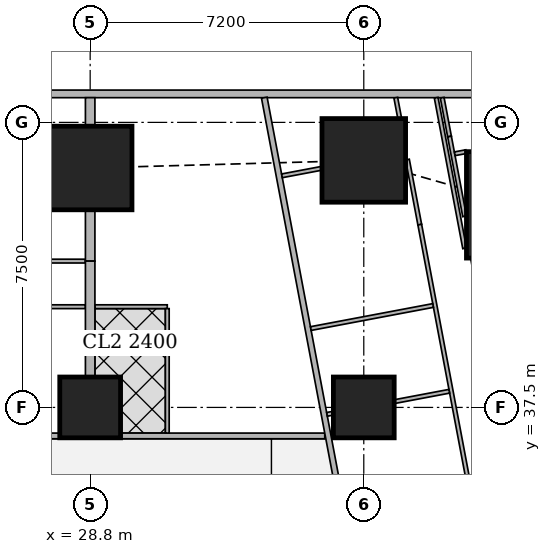
"""IFC4 building model, lengths in metres.
Left out: names, types, materials, properties, quantities, classifications, styles, units other than length and angle.
Written with IfcOpenShell. Run it as: python <this file> out.ifc"""

import sys

from ifc_helpers import new_model, si_unit, direction, frame, frame_2d, origin, origin_2d, place, context, subcontext, project, spatial, rectangle, extrude, element, fill, save


model = new_model("IFC4")
c1 = context("Model", 3, precision=1e-05, world=origin(), true_north=direction((0.0, 1.0)))
c2 = subcontext(c1, "Body", "Model", "MODEL_VIEW")
j1 = project(units=[si_unit("LENGTHUNIT", "METRE"), si_unit("PLANEANGLEUNIT", "RADIAN")], contexts=[c1])
p1 = place(None, origin())
s1 = spatial("IfcSite", under=j1, at=p1, CompositionType="ELEMENT")
p2 = place(p1, origin())
s2 = spatial("IfcBuilding", under=s1, at=p2, CompositionType="ELEMENT")
p3 = place(p2, frame((0.0, 0.0, 81.65)))
s3 = spatial("IfcBuildingStorey", under=s2, at=p3, CompositionType="ELEMENT", Elevation=81.65)
for number, where, z_axis, x_axis in (
    (1, (28.8, 37.5, 0.0), (0.0, 0.0, 1.0), (1.0, 0.0, 0.0)),
    (2, (36.0, 37.5, 0.0), (0.0, 0.0, 1.0), (1.0, 0.0, 0.0)),
):
    element("IfcColumn", number, at=place(p3, frame(where, z_axis=z_axis, x_axis=x_axis)), inside=s3, PredefinedType="COLUMN", context=c2, shape_type="SweptSolid", body=[
        extrude(rectangle(XDim=1.6, YDim=1.6, at=origin_2d()), origin(), (0.0, 0.0, 1.0), 3.75),
    ])
p4 = place(p3, frame((40.102, 42.83, 0.0), z_axis=(0.0, 0.0, 1.0), x_axis=(1.0, 0.0, 0.0)))
e3 = element("IfcColumn", 3, at=p4, inside=s3, PredefinedType="COLUMN", context=c2, shape_type="SweptSolid", body=[
    extrude(rectangle(XDim=2.8, YDim=2.8, at=origin_2d()), origin(), (0.0, 0.0, 1.0), 3.75),
])
for number, where, z_axis, x_axis in (
    (4, (28.8, 43.8, 0.0), (0.0, 0.0, 1.0), (1.0, 0.0, 0.0)),
    (5, (36.0, 44.0, 0.0), (0.0, 0.0, 1.0), (1.0, 0.0, 0.0)),
):
    element("IfcColumn", number, at=place(p3, frame(where, z_axis=z_axis, x_axis=x_axis)), inside=s3, PredefinedType="COLUMN", context=c2, shape_type="SweptSolid", body=[
        extrude(rectangle(XDim=2.2, YDim=2.2, at=origin_2d()), origin(), (0.0, 0.0, 1.0), 3.75),
    ])
p5 = place(p3, frame((40.106, 45.75, 0.0), z_axis=(0.0, 0.0, 1.0), x_axis=(-1.0, 0.0, 0.0)))
e6 = element("IfcWall", 6, at=p5, inside=s3, PredefinedType="SOLIDWALL", context=c2, shape_type="SweptSolid", body=[
    extrude(rectangle(XDim=37.943, YDim=0.2, at=frame_2d((18.971, 0.0))), origin(), (0.0, 0.0, 1.0), 3.5),
])
p6 = place(p5, frame((8.606, 0.0, 0.9)))
e7 = element("IfcOpeningElement", 7, at=p6, cuts=e6, PredefinedType="OPENING", context=c2, shape_type="SweptSolid", body=[
    extrude(rectangle(XDim=1.8, YDim=1.5, at=frame_2d((0.9, 0.75))), frame((0.0, 0.11, 0.0), z_axis=(0.0, -1.0, 0.0), x_axis=(1.0, 0.0, 0.0)), (0.0, 0.0, 1.0), 0.22),
])
p7 = place(p5, frame((12.206, 0.0, 0.9)))
e8 = element("IfcOpeningElement", 8, at=p7, cuts=e6, PredefinedType="OPENING", context=c2, shape_type="SweptSolid", body=[
    extrude(rectangle(XDim=1.8, YDim=1.5, at=frame_2d((0.9, 0.75))), frame((0.0, 0.11, 0.0), z_axis=(0.0, -1.0, 0.0), x_axis=(1.0, 0.0, 0.0)), (0.0, 0.0, 1.0), 0.22),
])
p8 = place(p5, frame((15.806, 0.0, 0.9)))
e9 = element("IfcOpeningElement", 9, at=p8, cuts=e6, PredefinedType="OPENING", context=c2, shape_type="SweptSolid", body=[
    extrude(rectangle(XDim=1.8, YDim=1.5, at=frame_2d((0.9, 0.75))), frame((0.0, 0.11, 0.0), z_axis=(0.0, -1.0, 0.0), x_axis=(1.0, 0.0, 0.0)), (0.0, 0.0, 1.0), 0.22),
])
p9 = place(p5, frame((19.406, 0.0, 0.9)))
e10 = element("IfcOpeningElement", 10, at=p9, cuts=e6, PredefinedType="OPENING", context=c2, shape_type="SweptSolid", body=[
    extrude(rectangle(XDim=1.8, YDim=1.5, at=frame_2d((0.9, 0.75))), frame((0.0, 0.11, 0.0), z_axis=(0.0, -1.0, 0.0), x_axis=(1.0, 0.0, 0.0)), (0.0, 0.0, 1.0), 0.22),
])
p10 = place(p5, frame((23.006, 0.0, 0.9)))
e11 = element("IfcOpeningElement", 11, at=p10, cuts=e6, PredefinedType="OPENING", context=c2, shape_type="SweptSolid", body=[
    extrude(rectangle(XDim=1.8, YDim=1.5, at=frame_2d((0.9, 0.75))), frame((0.0, 0.11, 0.0), z_axis=(0.0, -1.0, 0.0), x_axis=(1.0, 0.0, 0.0)), (0.0, 0.0, 1.0), 0.22),
])
p11 = place(p5, frame((26.606, 0.0, 0.9)))
e12 = element("IfcOpeningElement", 12, at=p11, cuts=e6, PredefinedType="OPENING", context=c2, shape_type="SweptSolid", body=[
    extrude(rectangle(XDim=1.8, YDim=1.5, at=frame_2d((0.9, 0.75))), frame((0.0, 0.11, 0.0), z_axis=(0.0, -1.0, 0.0), x_axis=(1.0, 0.0, 0.0)), (0.0, 0.0, 1.0), 0.22),
])
p12 = place(p3, frame((22.401, 36.75, 0.0), z_axis=(0.0, 0.0, 1.0), x_axis=(1.0, 0.0, 0.0)))
e13 = element("IfcWall", 13, at=p12, inside=s3, PredefinedType="SOLIDWALL", context=c2, shape_type="SweptSolid", body=[
    extrude(rectangle(XDim=5.598, YDim=0.15, at=frame_2d((2.799, 0.0))), origin(), (0.0, 0.0, 1.0), 3.5),
])
p13 = place(p3, frame((29.601, 36.75, 0.0), z_axis=(0.0, 0.0, 1.0), x_axis=(1.0, 0.0, 0.0)))
e14 = element("IfcWall", 14, at=p13, inside=s3, PredefinedType="SOLIDWALL", context=c2, shape_type="SweptSolid", body=[
    extrude(rectangle(XDim=5.372, YDim=0.15, at=frame_2d((2.686, 0.0))), origin(), (0.0, 0.0, 1.0), 3.5),
])
p14 = place(p13, frame((2.845, 0.0, 0.0)))
e15 = element("IfcOpeningElement", 15, at=p14, cuts=e14, PredefinedType="OPENING", context=c2, shape_type="SweptSolid", body=[
    extrude(rectangle(XDim=1.0, YDim=2.1, at=frame_2d((0.5, 1.05))), frame((0.0, 0.085, 0.0), z_axis=(0.0, -1.0, 0.0), x_axis=(1.0, 0.0, 0.0)), (0.0, 0.0, 1.0), 0.17),
])
p15 = place(p3, frame((33.382, 45.65, 0.0), z_axis=(0.0, 0.0, 1.0), x_axis=(0.185593544777, -0.982626600565, 0.0)))
e16 = element("IfcWall", 16, at=p15, inside=s3, PredefinedType="SOLIDWALL", context=c2, shape_type="SweptSolid", body=[
    extrude(rectangle(XDim=47.118, YDim=0.15, at=frame_2d((23.559, 0.0))), origin(), (0.0, 0.0, 1.0), 2.2),
])
p16 = place(p15, frame((19.054, 0.0, 0.0)))
e17 = element("IfcOpeningElement", 17, at=p16, cuts=e16, PredefinedType="OPENING", context=c2, shape_type="SweptSolid", body=[
    extrude(rectangle(XDim=1.0, YDim=2.1, at=frame_2d((0.5, 1.05))), frame((0.0, 0.085, 0.0), z_axis=(0.0, -1.0, 0.0), x_axis=(1.0, 0.0, 0.0)), (0.0, 0.0, 1.0), 0.17),
])
p17 = place(p15, frame((22.87, 0.0, 0.0)))
e18 = element("IfcOpeningElement", 18, at=p17, cuts=e16, PredefinedType="OPENING", context=c2, shape_type="SweptSolid", body=[
    extrude(rectangle(XDim=1.0, YDim=2.1, at=frame_2d((0.5, 1.05))), frame((0.0, 0.085, 0.0), z_axis=(0.0, -1.0, 0.0), x_axis=(1.0, 0.0, 0.0)), (0.0, 0.0, 1.0), 0.17),
])
p18 = place(p15, frame((33.833, 0.0, 0.0)))
e19 = element("IfcOpeningElement", 19, at=p18, cuts=e16, PredefinedType="OPENING", context=c2, shape_type="SweptSolid", body=[
    extrude(rectangle(XDim=1.0, YDim=2.1, at=frame_2d((0.5, 1.05))), frame((0.0, 0.085, 0.0), z_axis=(0.0, -1.0, 0.0), x_axis=(1.0, 0.0, 0.0)), (0.0, 0.0, 1.0), 0.17),
])
p19 = place(p3, frame((38.654, 41.686, 0.0), z_axis=(0.0, 0.0, 1.0), x_axis=(-0.185676896978, 0.982610853761, 0.0)))
e20 = element("IfcWall", 20, at=p19, inside=s3, PredefinedType="PARTITIONING", context=c2, shape_type="SweptSolid", body=[
    extrude(rectangle(XDim=4.034, YDim=0.1, at=frame_2d((2.017, 0.0))), origin(), (0.0, 0.0, 1.0), 2.05),
])
p20 = place(p3, frame((38.063, 45.65, 0.0), z_axis=(0.0, 0.0, 1.0), x_axis=(0.185677287841, -0.982610779902, 0.0)))
e21 = element("IfcWall", 21, at=p20, inside=s3, PredefinedType="PARTITIONING", context=c2, shape_type="SweptSolid", body=[
    extrude(rectangle(XDim=1.04, YDim=0.1, at=frame_2d((0.52, 0.0))), origin(), (0.0, 0.0, 1.0), 3.5),
])
p21 = place(p3, frame((38.256, 44.628, 0.0), z_axis=(0.0, 0.0, 1.0), x_axis=(0.185757524649, -0.982595614704, 0.0)))
e22 = element("IfcWall", 22, at=p21, inside=s3, PredefinedType="PARTITIONING", context=c2, shape_type="SweptSolid", body=[
    extrude(rectangle(XDim=2.137, YDim=0.1, at=frame_2d((1.068, 0.0))), origin(), (0.0, 0.0, 1.0), 2.05),
])
p22 = place(p3, frame((38.862, 41.42, 0.0), z_axis=(0.0, 0.0, 1.0), x_axis=(0.185529020159, -0.982638785454, 0.0)))
e23 = element("IfcWall", 23, at=p22, inside=s3, PredefinedType="PARTITIONING", context=c2, shape_type="SweptSolid", body=[
    extrude(rectangle(XDim=12.262, YDim=0.1, at=frame_2d((6.131, 0.0))), origin(), (0.0, 0.0, 1.0), 2.5),
])
p23 = place(p22, frame((11.212, 0.0, 0.0)))
e24 = element("IfcOpeningElement", 24, at=p23, cuts=e23, PredefinedType="OPENING", context=c2, shape_type="SweptSolid", body=[
    extrude(rectangle(XDim=0.9, YDim=2.1, at=frame_2d((0.45, 1.05))), frame((0.0, 0.06, 0.0), z_axis=(0.0, -1.0, 0.0), x_axis=(1.0, 0.0, 0.0)), (0.0, 0.0, 1.0), 0.12),
])
p24 = place(p22, frame((7.555, 0.0, 0.0)))
e25 = element("IfcOpeningElement", 25, at=p24, cuts=e23, PredefinedType="OPENING", context=c2, shape_type="SweptSolid", body=[
    extrude(rectangle(XDim=0.9, YDim=2.1, at=frame_2d((0.45, 1.05))), frame((0.0, 0.06, 0.0), z_axis=(0.0, -1.0, 0.0), x_axis=(1.0, 0.0, 0.0)), (0.0, 0.0, 1.0), 0.12),
])
p25 = place(p22, frame((3.579, 0.0, 0.0)))
e26 = element("IfcOpeningElement", 26, at=p25, cuts=e23, PredefinedType="OPENING", context=c2, shape_type="SweptSolid", body=[
    extrude(rectangle(XDim=0.9, YDim=2.1, at=frame_2d((0.45, 1.05))), frame((0.0, 0.06, 0.0), z_axis=(0.0, -1.0, 0.0), x_axis=(1.0, 0.0, 0.0)), (0.0, 0.0, 1.0), 0.12),
])
p26 = place(p3, frame((36.842, 45.65, 0.0), z_axis=(0.0, 0.0, 1.0), x_axis=(0.185764109712, -0.98259436979, 0.0)))
e27 = element("IfcWall", 27, at=p26, inside=s3, PredefinedType="PARTITIONING", context=c2, shape_type="SweptSolid", body=[
    extrude(rectangle(XDim=0.549, YDim=0.1, at=frame_2d((0.275, 0.0))), origin(), (0.0, 0.0, 1.0), 3.5),
])
p27 = place(p3, frame((37.149, 44.022, 0.0), z_axis=(0.0, 0.0, 1.0), x_axis=(0.185844162065, -0.982579232137, 0.0)))
e28 = element("IfcWall", 28, at=p27, inside=s3, PredefinedType="PARTITIONING", context=c2, shape_type="SweptSolid", body=[
    extrude(rectangle(XDim=1.743, YDim=0.1, at=frame_2d((0.872, 0.0))), origin(), (0.0, 0.0, 1.0), 2.05),
])
p28 = place(p3, frame((37.473, 42.309, 0.0), z_axis=(0.0, 0.0, 1.0), x_axis=(0.185570636839, -0.982630927024, 0.0)))
e29 = element("IfcWall", 29, at=p28, inside=s3, PredefinedType="PARTITIONING", context=c2, shape_type="SweptSolid", body=[
    extrude(rectangle(XDim=13.553, YDim=0.1, at=frame_2d((6.777, 0.0))), origin(), (0.0, 0.0, 1.0), 2.5),
])
p29 = place(p28, frame((12.049, 0.0, 0.0)))
e30 = element("IfcOpeningElement", 30, at=p29, cuts=e29, PredefinedType="OPENING", context=c2, shape_type="SweptSolid", body=[
    extrude(rectangle(XDim=0.9, YDim=2.1, at=frame_2d((0.45, 1.05))), frame((0.0, 0.06, 0.0), z_axis=(0.0, -1.0, 0.0), x_axis=(1.0, 0.0, 0.0)), (0.0, 0.0, 1.0), 0.12),
])
p30 = place(p28, frame((8.427, 0.0, 0.0)))
e31 = element("IfcOpeningElement", 31, at=p30, cuts=e29, PredefinedType="OPENING", context=c2, shape_type="SweptSolid", body=[
    extrude(rectangle(XDim=0.9, YDim=2.1, at=frame_2d((0.45, 1.05))), frame((0.0, 0.06, 0.0), z_axis=(0.0, -1.0, 0.0), x_axis=(1.0, 0.0, 0.0)), (0.0, 0.0, 1.0), 0.12),
])
p31 = place(p28, frame((2.853, 0.0, 0.0)))
e32 = element("IfcOpeningElement", 32, at=p31, cuts=e29, PredefinedType="OPENING", context=c2, shape_type="SweptSolid", body=[
    extrude(rectangle(XDim=0.9, YDim=2.1, at=frame_2d((0.45, 1.05))), frame((0.0, 0.06, 0.0), z_axis=(0.0, -1.0, 0.0), x_axis=(1.0, 0.0, 0.0)), (0.0, 0.0, 1.0), 0.12),
])
p32 = place(p28, frame((10.14, 0.0, 0.0)))
e33 = element("IfcOpeningElement", 33, at=p32, cuts=e29, PredefinedType="OPENING", context=c2, shape_type="SweptSolid", body=[
    extrude(rectangle(XDim=0.9, YDim=2.1, at=frame_2d((0.45, 1.05))), frame((0.0, 0.06, 0.0), z_axis=(0.0, -1.0, 0.0), x_axis=(1.0, 0.0, 0.0)), (0.0, 0.0, 1.0), 0.12),
])
p33 = place(p28, frame((5.759, 0.0, 0.0)))
e34 = element("IfcOpeningElement", 34, at=p33, cuts=e29, PredefinedType="OPENING", context=c2, shape_type="SweptSolid", body=[
    extrude(rectangle(XDim=0.9, YDim=2.1, at=frame_2d((0.45, 1.05))), frame((0.0, 0.06, 0.0), z_axis=(0.0, -1.0, 0.0), x_axis=(1.0, 0.0, 0.0)), (0.0, 0.0, 1.0), 0.12),
])
p34 = place(p3, frame((38.692, 44.23, 0.0), z_axis=(0.0, 0.0, 1.0), x_axis=(-0.982944840311, -0.183900627803, 0.0)))
e35 = element("IfcWall", 35, at=p34, inside=s3, PredefinedType="PARTITIONING", context=c2, shape_type="SweptSolid", body=[
    extrude(rectangle(XDim=0.304, YDim=0.1, at=frame_2d((0.152, 0.0))), origin(), (0.0, 0.0, 1.0), 2.05),
])
p35 = place(p3, frame((34.89, 43.791, 0.0), z_axis=(0.0, 0.0, 1.0), x_axis=(-0.982621304855, -0.185621580763, 0.0)))
e36 = element("IfcWall", 36, at=p35, inside=s3, PredefinedType="PARTITIONING", context=c2, shape_type="SweptSolid", body=[
    extrude(rectangle(XDim=1.062, YDim=0.1, at=frame_2d((0.531, 0.0))), origin(), (0.0, 0.0, 1.0), 2.05),
])
p36 = place(p3, frame((37.824, 40.182, 0.0), z_axis=(0.0, 0.0, 1.0), x_axis=(-0.982674977865, -0.185337227447, 0.0)))
e37 = element("IfcWall", 37, at=p36, inside=s3, PredefinedType="PARTITIONING", context=c2, shape_type="SweptSolid", body=[
    extrude(rectangle(XDim=3.275, YDim=0.1, at=frame_2d((1.637, 0.0))), origin(), (0.0, 0.0, 1.0), 3.5),
])
p37 = place(p3, frame((38.25, 37.925, 0.0), z_axis=(0.0, 0.0, 1.0), x_axis=(-0.982626127294, -0.185596050493, 0.0)))
e38 = element("IfcWall", 38, at=p37, inside=s3, PredefinedType="PARTITIONING", context=c2, shape_type="SweptSolid", body=[
    extrude(rectangle(XDim=1.465, YDim=0.1, at=frame_2d((0.733, 0.0))), origin(), (0.0, 0.0, 1.0), 3.5),
])
p38 = place(p3, frame((35.19, 37.347, 0.0), z_axis=(0.0, 0.0, 1.0), x_axis=(-0.982404955251, -0.186763229514, 0.0)))
e39 = element("IfcWall", 39, at=p38, inside=s3, PredefinedType="PARTITIONING", context=c2, shape_type="SweptSolid", body=[
    extrude(rectangle(XDim=0.161, YDim=0.1, at=frame_2d((0.081, 0.0))), origin(), (0.0, 0.0, 1.0), 3.5),
])
p39 = place(p3, frame((18.0, 41.35, 0.0), z_axis=(0.0, 0.0, 1.0), x_axis=(1.0, 0.0, 0.0)))
e40 = element("IfcWall", 40, at=p39, inside=s3, PredefinedType="PARTITIONING", context=c2, shape_type="SweptSolid", body=[
    extrude(rectangle(XDim=10.675, YDim=0.1, at=frame_2d((5.337, 0.0))), origin(), (0.0, 0.0, 1.0), 3.5),
])
p40 = place(p39, frame((0.2, 0.0, 0.0)))
e41 = element("IfcOpeningElement", 41, at=p40, cuts=e40, PredefinedType="OPENING", context=c2, shape_type="SweptSolid", body=[
    extrude(rectangle(XDim=0.9, YDim=2.1, at=frame_2d((0.45, 1.05))), frame((0.0, 0.06, 0.0), z_axis=(0.0, -1.0, 0.0), x_axis=(1.0, 0.0, 0.0)), (0.0, 0.0, 1.0), 0.12),
])
p41 = place(p39, frame((3.8, 0.0, 0.0)))
e42 = element("IfcOpeningElement", 42, at=p41, cuts=e40, PredefinedType="OPENING", context=c2, shape_type="SweptSolid", body=[
    extrude(rectangle(XDim=0.9, YDim=2.1, at=frame_2d((0.45, 1.05))), frame((0.0, 0.06, 0.0), z_axis=(0.0, -1.0, 0.0), x_axis=(1.0, 0.0, 0.0)), (0.0, 0.0, 1.0), 0.12),
])
p42 = place(p39, frame((7.4, 0.0, 0.0)))
e43 = element("IfcOpeningElement", 43, at=p42, cuts=e40, PredefinedType="OPENING", context=c2, shape_type="SweptSolid", body=[
    extrude(rectangle(XDim=0.9, YDim=2.1, at=frame_2d((0.45, 1.05))), frame((0.0, 0.06, 0.0), z_axis=(0.0, -1.0, 0.0), x_axis=(1.0, 0.0, 0.0)), (0.0, 0.0, 1.0), 0.12),
])
p43 = place(p3, frame((18.0, 40.15, 0.0), z_axis=(0.0, 0.0, 1.0), x_axis=(1.0, 0.0, 0.0)))
e44 = element("IfcWall", 44, at=p43, inside=s3, PredefinedType="PARTITIONING", context=c2, shape_type="SweptSolid", body=[
    extrude(rectangle(XDim=10.675, YDim=0.1, at=frame_2d((5.337, 0.0))), origin(), (0.0, 0.0, 1.0), 3.5),
])
p44 = place(p43, frame((0.655, 0.0, 0.0)))
e45 = element("IfcOpeningElement", 45, at=p44, cuts=e44, PredefinedType="OPENING", context=c2, shape_type="SweptSolid", body=[
    extrude(rectangle(XDim=0.9, YDim=2.1, at=frame_2d((0.45, 1.05))), frame((0.0, 0.06, 0.0), z_axis=(0.0, -1.0, 0.0), x_axis=(1.0, 0.0, 0.0)), (0.0, 0.0, 1.0), 0.12),
])
p45 = place(p43, frame((3.95, 0.0, 0.0)))
e46 = element("IfcOpeningElement", 46, at=p45, cuts=e44, PredefinedType="OPENING", context=c2, shape_type="SweptSolid", body=[
    extrude(rectangle(XDim=0.9, YDim=2.1, at=frame_2d((0.45, 1.05))), frame((0.0, 0.06, 0.0), z_axis=(0.0, -1.0, 0.0), x_axis=(1.0, 0.0, 0.0)), (0.0, 0.0, 1.0), 0.12),
])
p46 = place(p43, frame((7.66, 0.0, 0.0)))
e47 = element("IfcOpeningElement", 47, at=p46, cuts=e44, PredefinedType="OPENING", context=c2, shape_type="SweptSolid", body=[
    extrude(rectangle(XDim=0.9, YDim=2.1, at=frame_2d((0.45, 1.05))), frame((0.0, 0.06, 0.0), z_axis=(0.0, -1.0, 0.0), x_axis=(1.0, 0.0, 0.0)), (0.0, 0.0, 1.0), 0.12),
])
p47 = place(p43, frame((2.455, 0.0, 0.0)))
e48 = element("IfcOpeningElement", 48, at=p47, cuts=e44, PredefinedType="OPENING", context=c2, shape_type="SweptSolid", body=[
    extrude(rectangle(XDim=0.9, YDim=2.1, at=frame_2d((0.45, 1.05))), frame((0.0, 0.06, 0.0), z_axis=(0.0, -1.0, 0.0), x_axis=(1.0, 0.0, 0.0)), (0.0, 0.0, 1.0), 0.12),
])
p48 = place(p43, frame((5.75, 0.0, 0.0)))
e49 = element("IfcOpeningElement", 49, at=p48, cuts=e44, PredefinedType="OPENING", context=c2, shape_type="SweptSolid", body=[
    extrude(rectangle(XDim=0.9, YDim=2.1, at=frame_2d((0.45, 1.05))), frame((0.0, 0.06, 0.0), z_axis=(0.0, -1.0, 0.0), x_axis=(1.0, 0.0, 0.0)), (0.0, 0.0, 1.0), 0.12),
])
p49 = place(p43, frame((9.46, 0.0, 0.0)))
e50 = element("IfcOpeningElement", 50, at=p49, cuts=e44, PredefinedType="OPENING", context=c2, shape_type="SweptSolid", body=[
    extrude(rectangle(XDim=0.9, YDim=2.1, at=frame_2d((0.45, 1.05))), frame((0.0, 0.06, 0.0), z_axis=(0.0, -1.0, 0.0), x_axis=(1.0, 0.0, 0.0)), (0.0, 0.0, 1.0), 0.12),
])
p50 = place(p3, frame((28.925, 40.15, 0.0), z_axis=(0.0, 0.0, 1.0), x_axis=(1.0, 0.0, 0.0)))
e51 = element("IfcWall", 51, at=p50, inside=s3, PredefinedType="PARTITIONING", context=c2, shape_type="SweptSolid", body=[
    extrude(rectangle(XDim=1.904, YDim=0.1, at=frame_2d((0.952, 0.0))), origin(), (0.0, 0.0, 1.0), 3.5),
])
p51 = place(p50, frame((0.425, 0.0, 0.0)))
e52 = element("IfcOpeningElement", 52, at=p51, cuts=e51, PredefinedType="OPENING", context=c2, shape_type="SweptSolid", body=[
    extrude(rectangle(XDim=0.9, YDim=2.1, at=frame_2d((0.45, 1.05))), frame((0.0, 0.06, 0.0), z_axis=(0.0, -1.0, 0.0), x_axis=(1.0, 0.0, 0.0)), (0.0, 0.0, 1.0), 0.12),
])
p52 = place(p3, frame((30.829, 36.825, 0.0), z_axis=(0.0, 0.0, 1.0), x_axis=(0.0, 1.0, 0.0)))
e53 = element("IfcWall", 53, at=p52, inside=s3, PredefinedType="PARTITIONING", context=c2, shape_type="SweptSolid", body=[
    extrude(rectangle(XDim=3.275, YDim=0.1, at=frame_2d((1.638, 0.0))), origin(), (0.0, 0.0, 1.0), 3.5),
])
p53 = place(p3, frame((28.8, 41.35, 0.0), z_axis=(0.0, 0.0, 1.0), x_axis=(0.0, 1.0, 0.0)))
e54 = element("IfcWall", 54, at=p53, inside=s3, PredefinedType="SOLIDWALL", context=c2, shape_type="SweptSolid", body=[
    extrude(rectangle(XDim=1.349, YDim=0.25, at=frame_2d((0.674, 0.0))), origin(), (0.0, 0.0, 1.0), 3.5),
])
p54 = place(p3, frame((28.8, 44.901, 0.0), z_axis=(0.0, 0.0, 1.0), x_axis=(0.0, 1.0, 0.0)))
e55 = element("IfcWall", 55, at=p54, inside=s3, PredefinedType="SOLIDWALL", context=c2, shape_type="SweptSolid", body=[
    extrude(rectangle(XDim=0.749, YDim=0.25, at=frame_2d((0.375, 0.0))), origin(), (0.0, 0.0, 1.0), 3.5),
])
p55 = place(p3, frame((28.8, 38.301, 0.0), z_axis=(0.0, 0.0, 1.0), x_axis=(0.0, 1.0, 0.0)))
e56 = element("IfcWall", 56, at=p55, inside=s3, PredefinedType="SOLIDWALL", context=c2, shape_type="SweptSolid", body=[
    extrude(rectangle(XDim=3.049, YDim=0.25, at=frame_2d((1.524, 0.0))), origin(), (0.0, 0.0, 1.0), 3.5),
])
p56 = place(p6, origin())
e57 = element("IfcWindow", 57, at=p56, inside=s3, PartitioningType="SINGLE_PANEL", PredefinedType="WINDOW", context=c2, shape_type="SweptSolid", body=[
    extrude(rectangle(XDim=1.8, YDim=1.5, at=frame_2d((0.9, 0.75))), frame((0.0, 0.03, 0.0), z_axis=(0.0, -1.0, 0.0), x_axis=(1.0, 0.0, 0.0)), (0.0, 0.0, 1.0), 0.06),
])
fill(e7, e57)
p57 = place(p7, origin())
e58 = element("IfcWindow", 58, at=p57, inside=s3, PartitioningType="SINGLE_PANEL", PredefinedType="WINDOW", context=c2, shape_type="SweptSolid", body=[
    extrude(rectangle(XDim=1.8, YDim=1.5, at=frame_2d((0.9, 0.75))), frame((0.0, 0.03, 0.0), z_axis=(0.0, -1.0, 0.0), x_axis=(1.0, 0.0, 0.0)), (0.0, 0.0, 1.0), 0.06),
])
fill(e8, e58)
p58 = place(p31, origin())
e59 = element("IfcDoor", 59, at=p58, inside=s3, OperationType="SINGLE_SWING_RIGHT", PredefinedType="DOOR", context=c2, shape_type="SweptSolid", body=[
    extrude(rectangle(XDim=0.9, YDim=2.1, at=frame_2d((0.45, 1.05))), frame((0.0, 0.025, 0.0), z_axis=(0.0, -1.0, 0.0), x_axis=(1.0, 0.0, 0.0)), (0.0, 0.0, 1.0), 0.05),
])
fill(e32, e59)
p59 = place(p33, origin())
e60 = element("IfcDoor", 60, at=p59, inside=s3, OperationType="SINGLE_SWING_LEFT", PredefinedType="DOOR", context=c2, shape_type="SweptSolid", body=[
    extrude(rectangle(XDim=0.9, YDim=2.1, at=frame_2d((0.45, 1.05))), frame((0.0, 0.025, 0.0), z_axis=(0.0, -1.0, 0.0), x_axis=(1.0, 0.0, 0.0)), (0.0, 0.0, 1.0), 0.05),
])
fill(e34, e60)
p60 = place(p49, origin())
e61 = element("IfcDoor", 61, at=p60, inside=s3, OperationType="SINGLE_SWING_LEFT", PredefinedType="DOOR", context=c2, shape_type="SweptSolid", body=[
    extrude(rectangle(XDim=0.9, YDim=2.1, at=frame_2d((0.45, 1.05))), frame((0.0, 0.025, 0.0), z_axis=(0.0, -1.0, 0.0), x_axis=(1.0, 0.0, 0.0)), (0.0, 0.0, 1.0), 0.05),
])
fill(e50, e61)
p61 = place(p51, origin())
e62 = element("IfcDoor", 62, at=p61, inside=s3, OperationType="SINGLE_SWING_RIGHT", PredefinedType="DOOR", context=c2, shape_type="SweptSolid", body=[
    extrude(rectangle(XDim=0.9, YDim=2.1, at=frame_2d((0.45, 1.05))), frame((0.0, 0.025, 0.0), z_axis=(0.0, -1.0, 0.0), x_axis=(1.0, 0.0, 0.0)), (0.0, 0.0, 1.0), 0.05),
])
fill(e52, e62)
p62 = place(p14, origin())
e63 = element("IfcDoor", 63, at=p62, inside=s3, OperationType="SINGLE_SWING_RIGHT", PredefinedType="DOOR", context=c2, shape_type="SweptSolid", body=[
    extrude(rectangle(XDim=1.0, YDim=2.1, at=frame_2d((0.5, 1.05))), frame((0.0, 0.025, 0.0), z_axis=(0.0, -1.0, 0.0), x_axis=(1.0, 0.0, 0.0)), (0.0, 0.0, 1.0), 0.05),
])
fill(e15, e63)
save(model, sys.argv[1])
